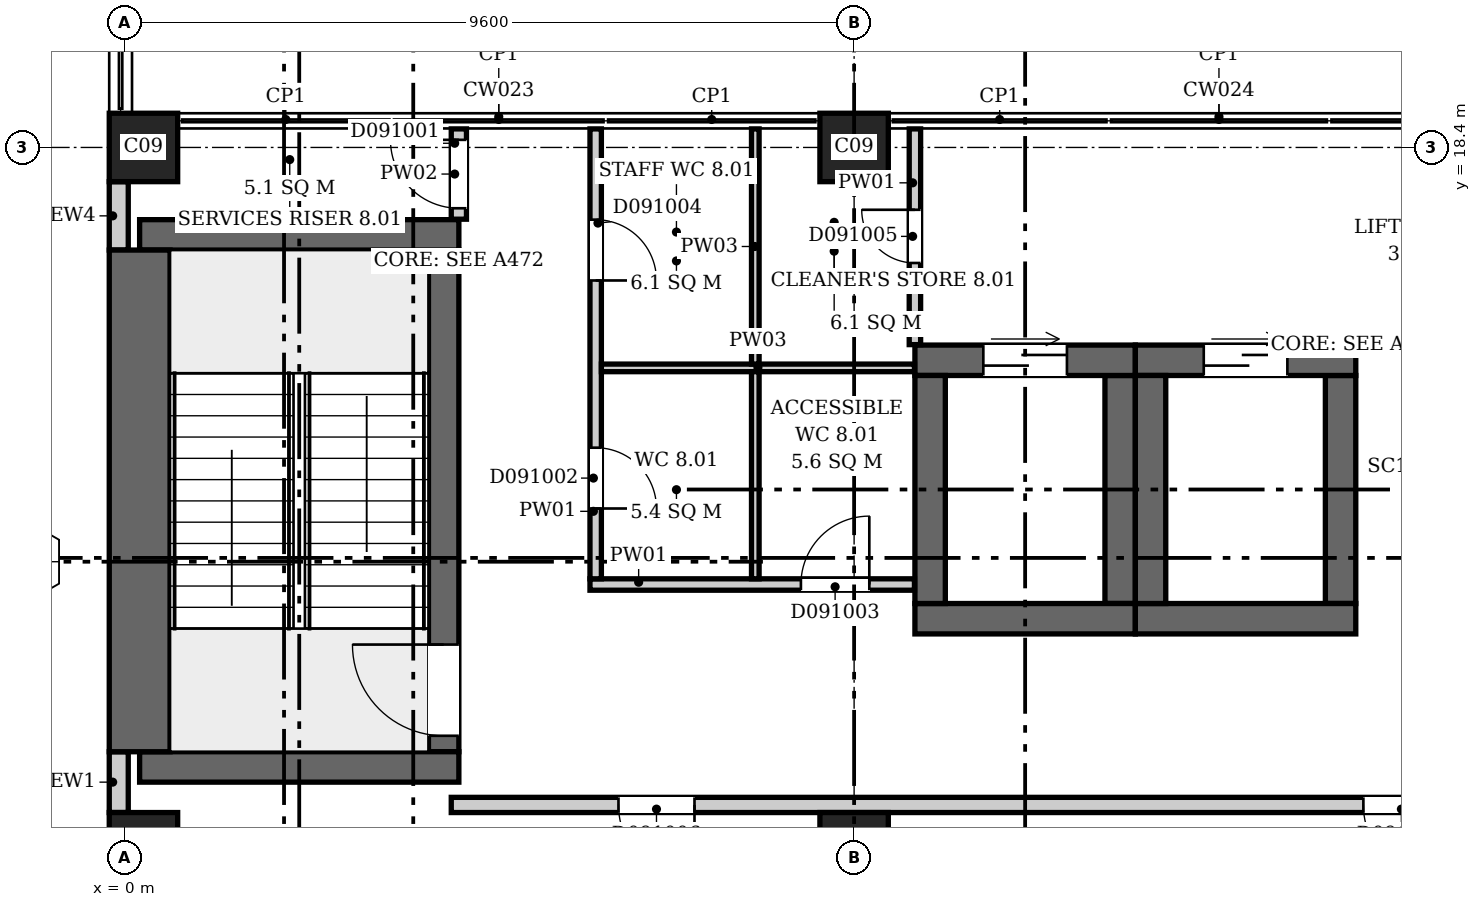
"""IFC4 building model, lengths in metres.
Left out: names, types, materials, properties, quantities, classifications, styles, units other than length and angle.
Written with IfcOpenShell. Run it as: python <this file> out.ifc"""

import sys

from ifc_helpers import new_model, si_unit, direction, frame, frame_2d, origin, origin_2d, place, context, subcontext, project, spatial, rectangle, extrude, element, fill, save


model = new_model("IFC4")
c1 = context("Model", 3, precision=1e-05, world=origin(), true_north=direction((0.0, 1.0)))
c2 = subcontext(c1, "Body", "Model", "MODEL_VIEW")
j1 = project(units=[si_unit("LENGTHUNIT", "METRE"), si_unit("PLANEANGLEUNIT", "RADIAN")], contexts=[c1])
p1 = place(None, origin())
s1 = spatial("IfcSite", under=j1, at=p1, CompositionType="ELEMENT")
p2 = place(p1, origin())
s2 = spatial("IfcBuilding", under=s1, at=p2, CompositionType="ELEMENT")
p3 = place(p2, frame((0.0, 0.0, 44.5)))
s3 = spatial("IfcBuildingStorey", under=s2, at=p3, CompositionType="ELEMENT", Elevation=44.5)
for number, where, z_axis, x_axis in (
    (1, (0.2, 10.25, 0.0), (0.0, 0.0, 1.0), (1.0, 0.0, 0.0)),
    (2, (0.2, 17.25, 0.0), (0.0, 0.0, 1.0), (1.0, 0.0, 0.0)),
):
    element("IfcWall", number, at=place(p3, frame(where, z_axis=z_axis, x_axis=x_axis)), inside=s3, PredefinedType="SHEAR", context=c2, shape_type="SweptSolid", body=[
        extrude(rectangle(XDim=4.2, YDim=0.4, at=frame_2d((2.1, 0.0))), origin(), (0.0, 0.0, 1.0), 4.2),
    ])
p4 = place(p3, frame((0.2, 10.45, 0.0), z_axis=(0.0, 0.0, 1.0), x_axis=(0.0, 1.0, 0.0)))
e3 = element("IfcWall", 3, at=p4, inside=s3, PredefinedType="SHEAR", context=c2, shape_type="SweptSolid", body=[
    extrude(rectangle(XDim=6.6, YDim=0.8, at=frame_2d((3.3, 0.0))), origin(), (0.0, 0.0, 1.0), 4.2),
])
p5 = place(p3, frame((4.2, 10.45, 0.0), z_axis=(0.0, 0.0, 1.0), x_axis=(0.0, 1.0, 0.0)))
e4 = element("IfcWall", 4, at=p5, inside=s3, PredefinedType="SHEAR", context=c2, shape_type="SweptSolid", body=[
    extrude(rectangle(XDim=6.6, YDim=0.4, at=frame_2d((3.3, 0.0))), origin(), (0.0, 0.0, 1.0), 4.2),
])
p6 = place(p5, frame((0.21, 0.0, 0.0)))
e5 = element("IfcOpeningElement", 5, at=p6, cuts=e4, PredefinedType="OPENING", context=c2, shape_type="SweptSolid", body=[
    extrude(rectangle(XDim=1.2, YDim=2.1, at=frame_2d((0.6, 1.05))), frame((0.0, 0.21, 0.0), z_axis=(0.0, -1.0, 0.0), x_axis=(1.0, 0.0, 0.0)), (0.0, 0.0, 1.0), 0.42),
])
p7 = place(p3, frame((10.4, 12.2, 0.0), z_axis=(0.0, 0.0, 1.0), x_axis=(1.0, 0.0, 0.0)))
e6 = element("IfcWall", 6, at=p7, inside=s3, PredefinedType="SHEAR", context=c2, shape_type="SweptSolid", body=[
    extrude(rectangle(XDim=2.9, YDim=0.4, at=frame_2d((1.45, 0.0))), origin(), (0.0, 0.0, 1.0), 4.2),
])
p8 = place(p3, frame((10.4, 15.6, 0.0), z_axis=(0.0, 0.0, 1.0), x_axis=(1.0, 0.0, 0.0)))
e7 = element("IfcWall", 7, at=p8, inside=s3, PredefinedType="SHEAR", context=c2, shape_type="SweptSolid", body=[
    extrude(rectangle(XDim=2.9, YDim=0.4, at=frame_2d((1.45, 0.0))), origin(), (0.0, 0.0, 1.0), 4.2),
])
p9 = place(p8, frame((0.9, 0.0, 0.0)))
e8 = element("IfcOpeningElement", 8, at=p9, cuts=e7, PredefinedType="OPENING", context=c2, shape_type="SweptSolid", body=[
    extrude(rectangle(XDim=1.1, YDim=2.1, at=frame_2d((0.55, 1.05))), frame((0.0, 0.21, 0.0), z_axis=(0.0, -1.0, 0.0), x_axis=(1.0, 0.0, 0.0)), (0.0, 0.0, 1.0), 0.42),
])
for number, where, z_axis, x_axis in (
    (9, (10.6, 12.4, 0.0), (0.0, 0.0, 1.0), (0.0, 1.0, 0.0)),
    (10, (13.1, 12.4, 0.0), (0.0, 0.0, 1.0), (0.0, 1.0, 0.0)),
):
    element("IfcWall", number, at=place(p3, frame(where, z_axis=z_axis, x_axis=x_axis)), inside=s3, PredefinedType="SHEAR", context=c2, shape_type="SweptSolid", body=[
        extrude(rectangle(XDim=3.0, YDim=0.4, at=frame_2d((1.5, 0.0))), origin(), (0.0, 0.0, 1.0), 4.2),
    ])
p10 = place(p3, frame((13.3, 12.2, 0.0), z_axis=(0.0, 0.0, 1.0), x_axis=(1.0, 0.0, 0.0)))
e11 = element("IfcWall", 11, at=p10, inside=s3, PredefinedType="SHEAR", context=c2, shape_type="SweptSolid", body=[
    extrude(rectangle(XDim=2.9, YDim=0.4, at=frame_2d((1.45, 0.0))), origin(), (0.0, 0.0, 1.0), 4.2),
])
p11 = place(p3, frame((13.3, 15.6, 0.0), z_axis=(0.0, 0.0, 1.0), x_axis=(1.0, 0.0, 0.0)))
e12 = element("IfcWall", 12, at=p11, inside=s3, PredefinedType="SHEAR", context=c2, shape_type="SweptSolid", body=[
    extrude(rectangle(XDim=2.9, YDim=0.4, at=frame_2d((1.45, 0.0))), origin(), (0.0, 0.0, 1.0), 4.2),
])
p12 = place(p11, frame((0.9, 0.0, 0.0)))
e13 = element("IfcOpeningElement", 13, at=p12, cuts=e12, PredefinedType="OPENING", context=c2, shape_type="SweptSolid", body=[
    extrude(rectangle(XDim=1.1, YDim=2.1, at=frame_2d((0.55, 1.05))), frame((0.0, 0.21, 0.0), z_axis=(0.0, -1.0, 0.0), x_axis=(1.0, 0.0, 0.0)), (0.0, 0.0, 1.0), 0.42),
])
for number, where, z_axis, x_axis in (
    (14, (13.5, 12.4, 0.0), (0.0, 0.0, 1.0), (0.0, 1.0, 0.0)),
    (15, (16.0, 12.4, 0.0), (0.0, 0.0, 1.0), (0.0, 1.0, 0.0)),
):
    element("IfcWall", number, at=place(p3, frame(where, z_axis=z_axis, x_axis=x_axis)), inside=s3, PredefinedType="SHEAR", context=c2, shape_type="SweptSolid", body=[
        extrude(rectangle(XDim=3.0, YDim=0.4, at=frame_2d((1.5, 0.0))), origin(), (0.0, 0.0, 1.0), 4.2),
    ])
for number, where, z_axis, x_axis in (
    (16, (0.25, 9.2, 0.0), (0.0, 0.0, 1.0), (1.0, 0.0, 0.0)),
    (17, (9.6, 9.2, 0.0), (0.0, 0.0, 1.0), (1.0, 0.0, 0.0)),
    (18, (0.25, 18.4, 0.0), (0.0, 0.0, 1.0), (1.0, 0.0, 0.0)),
    (19, (9.6, 18.4, 0.0), (0.0, 0.0, 1.0), (1.0, 0.0, 0.0)),
):
    element("IfcColumn", number, at=place(p3, frame(where, z_axis=z_axis, x_axis=x_axis)), inside=s3, PredefinedType="COLUMN", context=c2, shape_type="SweptSolid", body=[
        extrude(rectangle(XDim=0.9, YDim=0.9, at=origin_2d()), origin(), (0.0, 0.0, 1.0), 4.2),
    ])
p13 = place(p3, frame((-0.074, 10.45, 0.0), z_axis=(0.0, 0.0, 1.0), x_axis=(0.0, -1.0, 0.0)))
e20 = element("IfcWall", 20, at=p13, inside=s3, PredefinedType="ELEMENTEDWALL", context=c2, shape_type="SweptSolid", body=[
    extrude(rectangle(XDim=0.8, YDim=0.25, at=frame_2d((0.4, 0.0))), origin(), (0.0, 0.0, 1.0), 3.9),
])
p14 = place(p3, frame((-0.074, 17.95, 0.0), z_axis=(0.0, 0.0, 1.0), x_axis=(0.0, -1.0, 0.0)))
e21 = element("IfcWall", 21, at=p14, inside=s3, PredefinedType="ELEMENTEDWALL", context=c2, shape_type="SweptSolid", body=[
    extrude(rectangle(XDim=0.9, YDim=0.25, at=frame_2d((0.45, 0.0))), origin(), (0.0, 0.0, 1.0), 3.9),
])
p15 = place(p3, frame((4.3, 9.75, 0.0), z_axis=(0.0, 0.0, 1.0), x_axis=(1.0, 0.0, 0.0)))
e22 = element("IfcWall", 22, at=p15, inside=s3, PredefinedType="PARTITIONING", context=c2, shape_type="SweptSolid", body=[
    extrude(rectangle(XDim=43.894, YDim=0.2, at=frame_2d((21.947, 0.0))), origin(), (0.0, 0.0, 1.0), 3.9),
])
p16 = place(p15, frame((2.2, 0.0, 0.0)))
e23 = element("IfcOpeningElement", 23, at=p16, cuts=e22, PredefinedType="OPENING", context=c2, shape_type="SweptSolid", body=[
    extrude(rectangle(XDim=1.0, YDim=2.1, at=frame_2d((0.5, 1.05))), frame((0.0, 0.11, 0.0), z_axis=(0.0, -1.0, 0.0), x_axis=(1.0, 0.0, 0.0)), (0.0, 0.0, 1.0), 0.22),
])
p17 = place(p15, frame((12.0, 0.0, 0.0)))
e24 = element("IfcOpeningElement", 24, at=p17, cuts=e22, PredefinedType="OPENING", context=c2, shape_type="SweptSolid", body=[
    extrude(rectangle(XDim=1.0, YDim=2.1, at=frame_2d((0.5, 1.05))), frame((0.0, 0.11, 0.0), z_axis=(0.0, -1.0, 0.0), x_axis=(1.0, 0.0, 0.0)), (0.0, 0.0, 1.0), 0.22),
])
p18 = place(p15, frame((21.6, 0.0, 0.0)))
e25 = element("IfcOpeningElement", 25, at=p18, cuts=e22, PredefinedType="OPENING", context=c2, shape_type="SweptSolid", body=[
    extrude(rectangle(XDim=1.0, YDim=2.1, at=frame_2d((0.5, 1.05))), frame((0.0, 0.11, 0.0), z_axis=(0.0, -1.0, 0.0), x_axis=(1.0, 0.0, 0.0)), (0.0, 0.0, 1.0), 0.22),
])
p19 = place(p15, frame((28.8, 0.0, 0.0)))
e26 = element("IfcOpeningElement", 26, at=p19, cuts=e22, PredefinedType="OPENING", context=c2, shape_type="SweptSolid", body=[
    extrude(rectangle(XDim=1.0, YDim=2.1, at=frame_2d((0.5, 1.05))), frame((0.0, 0.11, 0.0), z_axis=(0.0, -1.0, 0.0), x_axis=(1.0, 0.0, 0.0)), (0.0, 0.0, 1.0), 0.22),
])
p20 = place(p15, frame((38.25, 0.0, 0.0)))
e27 = element("IfcOpeningElement", 27, at=p20, cuts=e22, PredefinedType="OPENING", context=c2, shape_type="SweptSolid", body=[
    extrude(rectangle(XDim=1.5, YDim=2.1, at=frame_2d((0.75, 1.05))), frame((0.0, 0.11, 0.0), z_axis=(0.0, -1.0, 0.0), x_axis=(1.0, 0.0, 0.0)), (0.0, 0.0, 1.0), 0.22),
])
p21 = place(p3, frame((4.4, 17.456, 0.0), z_axis=(0.0, 0.0, 1.0), x_axis=(0.0, 1.0, 0.0)))
e28 = element("IfcWall", 28, at=p21, inside=s3, PredefinedType="PARTITIONING", context=c2, shape_type="SweptSolid", body=[
    extrude(rectangle(XDim=1.188, YDim=0.2, at=frame_2d((0.594, 0.0))), origin(), (0.0, 0.0, 1.0), 3.9),
])
p22 = place(p21, frame((0.144, 0.0, 0.0)))
e29 = element("IfcOpeningElement", 29, at=p22, cuts=e28, PredefinedType="OPENING", context=c2, shape_type="SweptSolid", body=[
    extrude(rectangle(XDim=0.9, YDim=2.1, at=frame_2d((0.45, 1.05))), frame((0.0, 0.11, 0.0), z_axis=(0.0, -1.0, 0.0), x_axis=(1.0, 0.0, 0.0)), (0.0, 0.0, 1.0), 0.22),
])
p23 = place(p3, frame((6.125, 12.65, 0.0), z_axis=(0.0, 0.0, 1.0), x_axis=(1.0, 0.0, 0.0)))
e30 = element("IfcWall", 30, at=p23, inside=s3, PredefinedType="PARTITIONING", context=c2, shape_type="SweptSolid", body=[
    extrude(rectangle(XDim=4.269, YDim=0.15, at=frame_2d((2.135, 0.0))), origin(), (0.0, 0.0, 1.0), 3.9),
])
p24 = place(p23, frame((2.775, 0.0, 0.0)))
e31 = element("IfcOpeningElement", 31, at=p24, cuts=e30, PredefinedType="OPENING", context=c2, shape_type="SweptSolid", body=[
    extrude(rectangle(XDim=0.9, YDim=2.1, at=frame_2d((0.45, 1.05))), frame((0.0, 0.085, 0.0), z_axis=(0.0, -1.0, 0.0), x_axis=(1.0, 0.0, 0.0)), (0.0, 0.0, 1.0), 0.17),
])
p25 = place(p3, frame((6.2, 12.725, 0.0), z_axis=(0.0, 0.0, 1.0), x_axis=(0.0, 1.0, 0.0)))
e32 = element("IfcWall", 32, at=p25, inside=s3, PredefinedType="PARTITIONING", context=c2, shape_type="SweptSolid", body=[
    extrude(rectangle(XDim=5.919, YDim=0.15, at=frame_2d((2.959, 0.0))), origin(), (0.0, 0.0, 1.0), 3.9),
])
p26 = place(p25, frame((0.925, 0.0, 0.0)))
e33 = element("IfcOpeningElement", 33, at=p26, cuts=e32, PredefinedType="OPENING", context=c2, shape_type="SweptSolid", body=[
    extrude(rectangle(XDim=0.8, YDim=2.1, at=frame_2d((0.4, 1.05))), frame((0.0, 0.085, 0.0), z_axis=(0.0, -1.0, 0.0), x_axis=(1.0, 0.0, 0.0)), (0.0, 0.0, 1.0), 0.17),
])
p27 = place(p25, frame((3.925, 0.0, 0.0)))
e34 = element("IfcOpeningElement", 34, at=p27, cuts=e32, PredefinedType="OPENING", context=c2, shape_type="SweptSolid", body=[
    extrude(rectangle(XDim=0.8, YDim=2.1, at=frame_2d((0.4, 1.05))), frame((0.0, 0.085, 0.0), z_axis=(0.0, -1.0, 0.0), x_axis=(1.0, 0.0, 0.0)), (0.0, 0.0, 1.0), 0.17),
])
p28 = place(p3, frame((6.275, 15.5, 0.0), z_axis=(0.0, 0.0, 1.0), x_axis=(1.0, 0.0, 0.0)))
e35 = element("IfcWall", 35, at=p28, inside=s3, PredefinedType="PARTITIONING", context=c2, shape_type="SweptSolid", body=[
    extrude(rectangle(XDim=4.119, YDim=0.1, at=frame_2d((2.06, 0.0))), origin(), (0.0, 0.0, 1.0), 3.9),
])
p29 = place(p3, frame((8.3, 12.725, 0.0), z_axis=(0.0, 0.0, 1.0), x_axis=(0.0, 1.0, 0.0)))
e36 = element("IfcWall", 36, at=p29, inside=s3, PredefinedType="PARTITIONING", context=c2, shape_type="SweptSolid", body=[
    extrude(rectangle(XDim=2.725, YDim=0.1, at=frame_2d((1.362, 0.0))), origin(), (0.0, 0.0, 1.0), 3.9),
])
p30 = place(p3, frame((8.3, 15.55, 0.0), z_axis=(0.0, 0.0, 1.0), x_axis=(0.0, 1.0, 0.0)))
e37 = element("IfcWall", 37, at=p30, inside=s3, PredefinedType="PARTITIONING", context=c2, shape_type="SweptSolid", body=[
    extrude(rectangle(XDim=3.094, YDim=0.1, at=frame_2d((1.547, 0.0))), origin(), (0.0, 0.0, 1.0), 3.9),
])
p31 = place(p3, frame((10.4, 15.806, 0.0), z_axis=(0.0, 0.0, 1.0), x_axis=(0.0, 1.0, 0.0)))
e38 = element("IfcWall", 38, at=p31, inside=s3, PredefinedType="PARTITIONING", context=c2, shape_type="SweptSolid", body=[
    extrude(rectangle(XDim=2.838, YDim=0.15, at=frame_2d((1.419, 0.0))), origin(), (0.0, 0.0, 1.0), 3.9),
])
p32 = place(p31, frame((1.074, 0.0, 0.0)))
e39 = element("IfcOpeningElement", 39, at=p32, cuts=e38, PredefinedType="OPENING", context=c2, shape_type="SweptSolid", body=[
    extrude(rectangle(XDim=0.7, YDim=2.1, at=frame_2d((0.35, 1.05))), frame((0.0, 0.085, 0.0), z_axis=(0.0, -1.0, 0.0), x_axis=(1.0, 0.0, 0.0)), (0.0, 0.0, 1.0), 0.17),
])
p33 = place(p6, origin())
e40 = element("IfcDoor", 40, at=p33, inside=s3, OperationType="SINGLE_SWING_RIGHT", PredefinedType="DOOR", context=c2, shape_type="SweptSolid", body=[
    extrude(rectangle(XDim=1.2, YDim=2.1, at=frame_2d((0.6, 1.05))), frame((0.0, 0.025, 0.0), z_axis=(0.0, -1.0, 0.0), x_axis=(1.0, 0.0, 0.0)), (0.0, 0.0, 1.0), 0.05),
])
fill(e5, e40)
p34 = place(p9, origin())
e41 = element("IfcDoor", 41, at=p34, inside=s3, OperationType="DOUBLE_DOOR_SLIDING", PredefinedType="DOOR", context=c2, shape_type="SweptSolid", body=[
    extrude(rectangle(XDim=1.1, YDim=2.1, at=frame_2d((0.55, 1.05))), frame((0.0, 0.025, 0.0), z_axis=(0.0, -1.0, 0.0), x_axis=(1.0, 0.0, 0.0)), (0.0, 0.0, 1.0), 0.05),
])
fill(e8, e41)
p35 = place(p12, origin())
e42 = element("IfcDoor", 42, at=p35, inside=s3, OperationType="DOUBLE_DOOR_SLIDING", PredefinedType="DOOR", context=c2, shape_type="SweptSolid", body=[
    extrude(rectangle(XDim=1.1, YDim=2.1, at=frame_2d((0.55, 1.05))), frame((0.0, 0.025, 0.0), z_axis=(0.0, -1.0, 0.0), x_axis=(1.0, 0.0, 0.0)), (0.0, 0.0, 1.0), 0.05),
])
fill(e13, e42)
p36 = place(p22, origin())
e43 = element("IfcDoor", 43, at=p36, inside=s3, OperationType="SINGLE_SWING_LEFT", PredefinedType="DOOR", context=c2, shape_type="SweptSolid", body=[
    extrude(rectangle(XDim=0.9, YDim=2.1, at=frame_2d((0.45, 1.05))), frame((0.0, 0.025, 0.0), z_axis=(0.0, -1.0, 0.0), x_axis=(1.0, 0.0, 0.0)), (0.0, 0.0, 1.0), 0.05),
])
fill(e29, e43)
p37 = place(p26, origin())
e44 = element("IfcDoor", 44, at=p37, inside=s3, OperationType="SINGLE_SWING_LEFT", PredefinedType="DOOR", context=c2, shape_type="SweptSolid", body=[
    extrude(rectangle(XDim=0.8, YDim=2.1, at=frame_2d((0.4, 1.05))), frame((0.0, 0.025, 0.0), z_axis=(0.0, -1.0, 0.0), x_axis=(1.0, 0.0, 0.0)), (0.0, 0.0, 1.0), 0.05),
])
fill(e33, e44)
p38 = place(p24, origin())
e45 = element("IfcDoor", 45, at=p38, inside=s3, OperationType="SINGLE_SWING_RIGHT", PredefinedType="DOOR", context=c2, shape_type="SweptSolid", body=[
    extrude(rectangle(XDim=0.9, YDim=2.1, at=frame_2d((0.45, 1.05))), frame((0.0, 0.025, 0.0), z_axis=(0.0, -1.0, 0.0), x_axis=(1.0, 0.0, 0.0)), (0.0, 0.0, 1.0), 0.05),
])
fill(e31, e45)
p39 = place(p27, origin())
e46 = element("IfcDoor", 46, at=p39, inside=s3, OperationType="SINGLE_SWING_LEFT", PredefinedType="DOOR", context=c2, shape_type="SweptSolid", body=[
    extrude(rectangle(XDim=0.8, YDim=2.1, at=frame_2d((0.4, 1.05))), frame((0.0, 0.025, 0.0), z_axis=(0.0, -1.0, 0.0), x_axis=(1.0, 0.0, 0.0)), (0.0, 0.0, 1.0), 0.05),
])
fill(e34, e46)
p40 = place(p32, origin())
e47 = element("IfcDoor", 47, at=p40, inside=s3, OperationType="SINGLE_SWING_LEFT", PredefinedType="DOOR", context=c2, shape_type="SweptSolid", body=[
    extrude(rectangle(XDim=0.7, YDim=2.1, at=frame_2d((0.35, 1.05))), frame((0.0, 0.025, 0.0), z_axis=(0.0, -1.0, 0.0), x_axis=(1.0, 0.0, 0.0)), (0.0, 0.0, 1.0), 0.05),
])
fill(e39, e47)
p41 = place(p16, origin())
e48 = element("IfcDoor", 48, at=p41, inside=s3, OperationType="SINGLE_SWING_RIGHT", PredefinedType="DOOR", context=c2, shape_type="SweptSolid", body=[
    extrude(rectangle(XDim=1.0, YDim=2.1, at=frame_2d((0.5, 1.05))), frame((0.0, 0.025, 0.0), z_axis=(0.0, -1.0, 0.0), x_axis=(1.0, 0.0, 0.0)), (0.0, 0.0, 1.0), 0.05),
])
fill(e23, e48)
p42 = place(p17, origin())
e49 = element("IfcDoor", 49, at=p42, inside=s3, OperationType="SINGLE_SWING_RIGHT", PredefinedType="DOOR", context=c2, shape_type="SweptSolid", body=[
    extrude(rectangle(XDim=1.0, YDim=2.1, at=frame_2d((0.5, 1.05))), frame((0.0, 0.025, 0.0), z_axis=(0.0, -1.0, 0.0), x_axis=(1.0, 0.0, 0.0)), (0.0, 0.0, 1.0), 0.05),
])
fill(e24, e49)
save(model, sys.argv[1])
